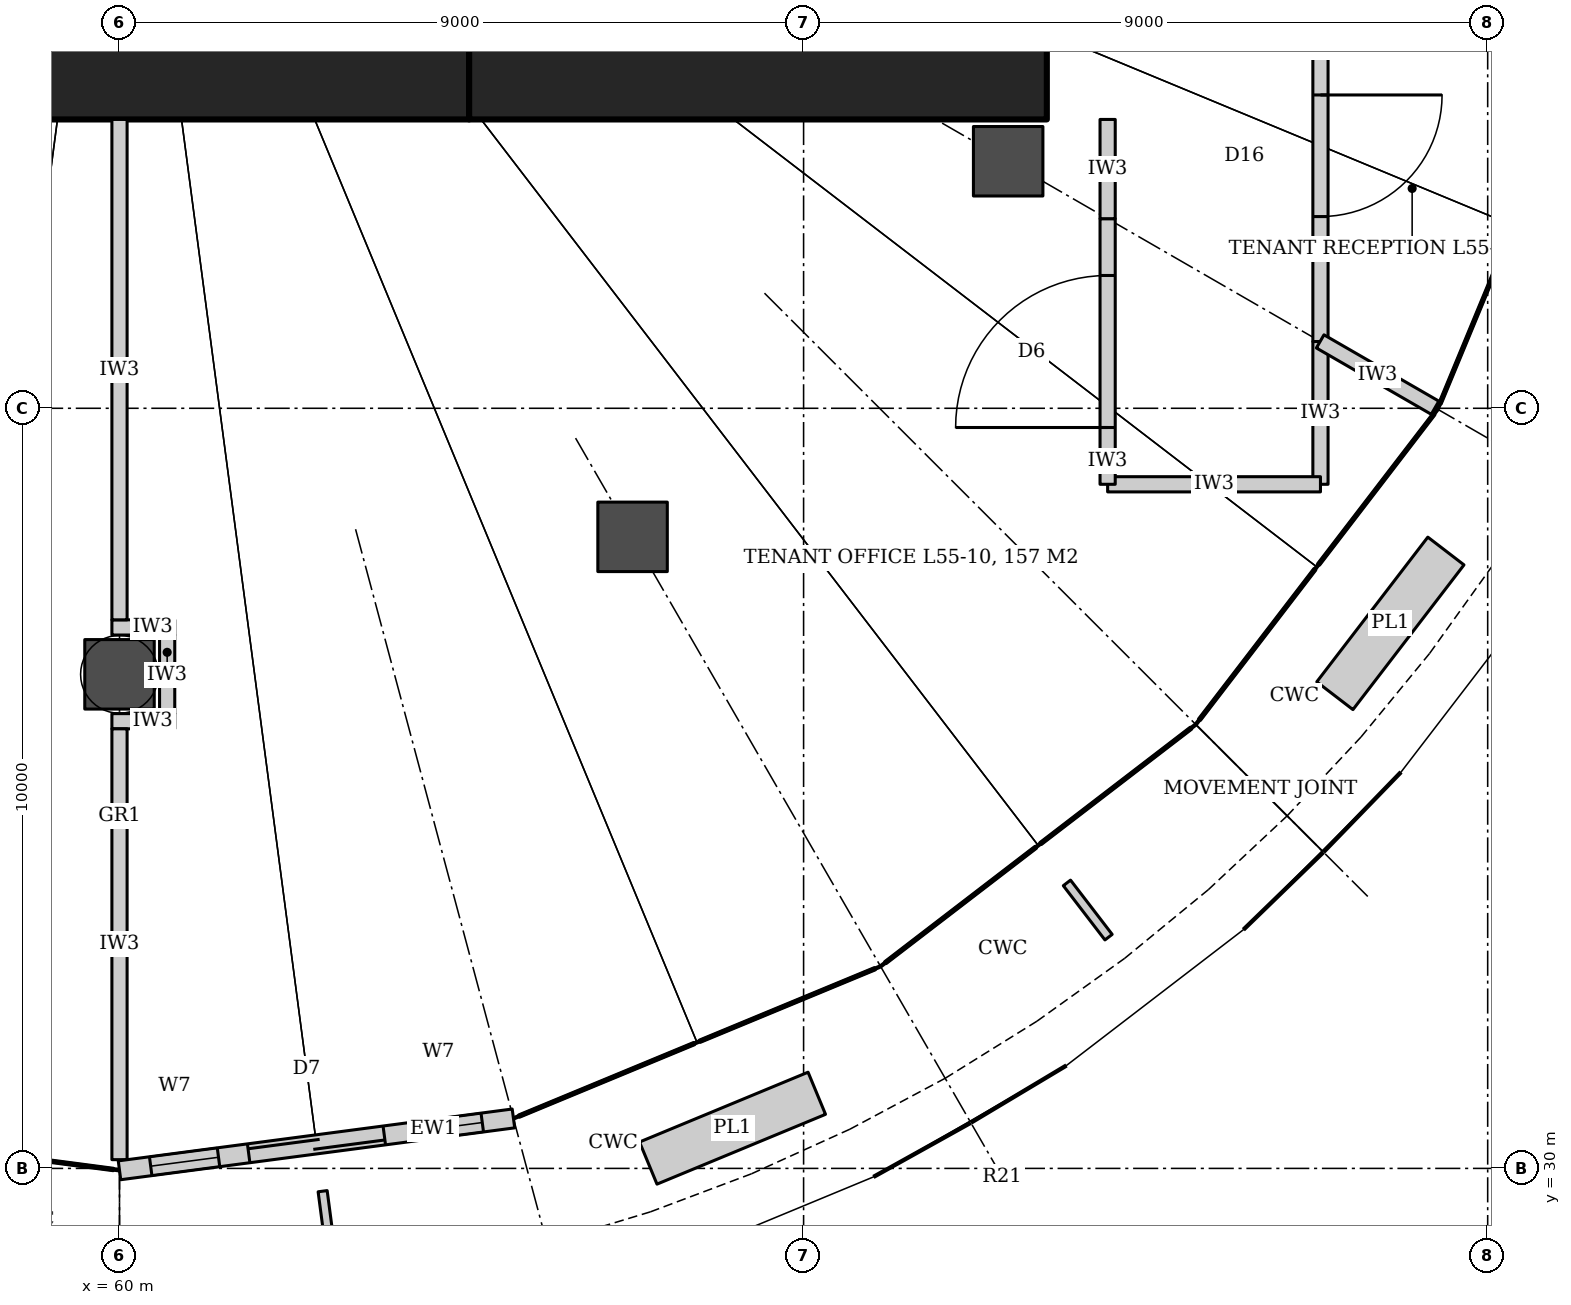
"""IFC4 building model, lengths in metres.
Left out: names, types, materials, properties, quantities, classifications, styles, units other than length and angle.
Written with IfcOpenShell. Run it as: python <this file> out.ifc"""

import sys

from ifc_helpers import new_model, si_unit, direction, frame, frame_2d, origin, origin_2d, place, context, subcontext, project, spatial, rectangle, hollow_circle, extrude, element, fill, save


model = new_model("IFC4")
c1 = context("Model", 3, precision=1e-05, world=origin(), true_north=direction((0.0, 1.0)))
c2 = subcontext(c1, "Body", "Model", "MODEL_VIEW")
j1 = project(units=[si_unit("LENGTHUNIT", "METRE"), si_unit("PLANEANGLEUNIT", "RADIAN")], contexts=[c1])
p1 = place(None, origin())
s1 = spatial("IfcSite", under=j1, at=p1, CompositionType="ELEMENT")
p2 = place(p1, origin())
s2 = spatial("IfcBuilding", under=s1, at=p2, CompositionType="ELEMENT")
p3 = place(p2, frame((0.0, 0.0, 240.2)))
s3 = spatial("IfcBuildingStorey", under=s2, at=p3, CompositionType="ELEMENT", Elevation=240.2)
p4 = place(p3, frame((55.4, 44.55, 0.0), z_axis=(0.0, 0.0, 1.0), x_axis=(1.0, 0.0, 0.0)))
e1 = element("IfcWall", 1, at=p4, inside=s3, PredefinedType="SHEAR", context=c2, shape_type="SweptSolid", body=[
    extrude(rectangle(XDim=9.2, YDim=1.5, at=frame_2d((4.6, 0.0))), origin(), (0.0, 0.0, 1.0), 4.2),
])
p5 = place(p3, frame((64.6, 44.55, 0.0), z_axis=(0.0, 0.0, 1.0), x_axis=(1.0, 0.0, 0.0)))
e2 = element("IfcWall", 2, at=p5, inside=s3, PredefinedType="SHEAR", context=c2, shape_type="SweptSolid", body=[
    extrude(rectangle(XDim=7.6, YDim=1.5, at=frame_2d((3.8, 0.0))), origin(), (0.0, 0.0, 1.0), 4.2),
])
for number, where, z_axis, x_axis in (
    (3, (60.0, 36.5, 0.0), (0.0, 0.0, 1.0), (1.0, 0.0, 0.0)),
    (4, (66.75, 38.309, 0.0), (0.0, 0.0, 1.0), (1.0, 0.0, 0.0)),
    (5, (71.691, 43.25, 0.0), (0.0, 0.0, 1.0), (1.0, 0.0, 0.0)),
):
    element("IfcColumn", number, at=place(p3, frame(where, z_axis=z_axis, x_axis=x_axis)), inside=s3, PredefinedType="COLUMN", context=c2, shape_type="SweptSolid", body=[
        extrude(hollow_circle(Radius=0.457, WallThickness=0.045, at=origin_2d()), origin(), (0.0, 0.0, 1.0), 4.2),
    ])
p6 = place(p3, frame((75.8, 45.766, 0.0), z_axis=(0.0, 0.0, 1.0), x_axis=(0.0, -1.0, 0.0)))
e6 = element("IfcWall", 6, at=p6, inside=s3, PredefinedType="PARTITIONING", context=c2, shape_type="SweptSolid", body=[
    extrude(rectangle(XDim=4.888, YDim=0.2, at=frame_2d((2.444, 0.0))), origin(), (0.0, 0.0, 1.0), 3.02),
])
p7 = place(p6, frame((1.644, 0.0, 0.0)))
e7 = element("IfcOpeningElement", 7, at=p7, cuts=e6, PredefinedType="OPENING", context=c2, shape_type="SweptSolid", body=[
    extrude(rectangle(XDim=1.6, YDim=2.4, at=frame_2d((0.8, 1.2))), frame((0.0, 0.11, 0.0), z_axis=(0.0, -1.0, 0.0), x_axis=(1.0, 0.0, 0.0)), (0.0, 0.0, 1.0), 0.22),
])
p8 = place(p3, frame((75.8, 40.878, 0.0), z_axis=(0.0, 0.0, 1.0), x_axis=(0.0, -1.0, 0.0)))
e8 = element("IfcWall", 8, at=p8, inside=s3, PredefinedType="PARTITIONING", context=c2, shape_type="SweptSolid", body=[
    extrude(rectangle(XDim=1.878, YDim=0.2, at=frame_2d((0.939, 0.0))), origin(), (0.0, 0.0, 1.0), 3.02),
])
p9 = place(p3, frame((75.8, 39.0, 0.0), z_axis=(0.0, 0.0, 1.0), x_axis=(-1.0, 0.0, 0.0)))
e9 = element("IfcWall", 9, at=p9, inside=s3, PredefinedType="PARTITIONING", context=c2, shape_type="SweptSolid", body=[
    extrude(rectangle(XDim=2.8, YDim=0.2, at=frame_2d((1.4, 0.0))), origin(), (0.0, 0.0, 1.0), 3.04),
])
p10 = place(p3, frame((73.0, 39.0, 0.0), z_axis=(0.0, 0.0, 1.0), x_axis=(0.0, 1.0, 0.0)))
e10 = element("IfcWall", 10, at=p10, inside=s3, PredefinedType="PARTITIONING", context=c2, shape_type="SweptSolid", body=[
    extrude(rectangle(XDim=3.494, YDim=0.2, at=frame_2d((1.747, 0.0))), origin(), (0.0, 0.0, 1.0), 3.02),
])
p11 = place(p10, frame((0.747, 0.0, 0.0)))
e11 = element("IfcOpeningElement", 11, at=p11, cuts=e10, PredefinedType="OPENING", context=c2, shape_type="SweptSolid", body=[
    extrude(rectangle(XDim=2.0, YDim=2.1, at=frame_2d((1.0, 1.05))), frame((0.0, 0.11, 0.0), z_axis=(0.0, -1.0, 0.0), x_axis=(1.0, 0.0, 0.0)), (0.0, 0.0, 1.0), 0.22),
])
p12 = place(p3, frame((73.0, 42.494, 0.0), z_axis=(0.0, 0.0, 1.0), x_axis=(0.0, 1.0, 0.0)))
e12 = element("IfcWall", 12, at=p12, inside=s3, PredefinedType="PARTITIONING", context=c2, shape_type="SweptSolid", body=[
    extrude(rectangle(XDim=1.306, YDim=0.2, at=frame_2d((0.653, 0.0))), origin(), (0.0, 0.0, 1.0), 3.02),
])
for number, where, z_axis, x_axis in (
    (13, (59.9, 37.117, 0.0), (0.0, 0.0, 1.0), (1.0, 0.0, 0.0)),
    (14, (59.9, 35.883, 0.0), (0.0, 0.0, 1.0), (1.0, 0.0, 0.0)),
):
    element("IfcWall", number, at=place(p3, frame(where, z_axis=z_axis, x_axis=x_axis)), inside=s3, PredefinedType="PARTITIONING", context=c2, shape_type="SweptSolid", body=[
        extrude(rectangle(XDim=0.827, YDim=0.2, at=frame_2d((0.414, 0.0))), origin(), (0.0, 0.0, 1.0), 3.02),
    ])
p13 = place(p3, frame((60.627, 37.017, 0.0), z_axis=(0.0, 0.0, 1.0), x_axis=(0.0, -1.0, 0.0)))
e15 = element("IfcWall", 15, at=p13, inside=s3, PredefinedType="PARTITIONING", context=c2, shape_type="SweptSolid", body=[
    extrude(rectangle(XDim=1.034, YDim=0.2, at=frame_2d((0.517, 0.0))), origin(), (0.0, 0.0, 1.0), 3.02),
])
p14 = place(p3, frame((60.0, 43.8, 0.0), z_axis=(0.0, 0.0, 1.0), x_axis=(0.0, -1.0, 0.0)))
e16 = element("IfcWall", 16, at=p14, inside=s3, PredefinedType="PARTITIONING", context=c2, shape_type="SweptSolid", body=[
    extrude(rectangle(XDim=6.583, YDim=0.2, at=frame_2d((3.292, 0.0))), origin(), (0.0, 0.0, 1.0), 3.04),
])
p15 = place(p3, frame((60.0, 35.783, 0.0), z_axis=(0.0, 0.0, 1.0), x_axis=(0.0, -1.0, 0.0)))
e17 = element("IfcWall", 17, at=p15, inside=s3, PredefinedType="PARTITIONING", context=c2, shape_type="SweptSolid", body=[
    extrude(rectangle(XDim=5.668, YDim=0.2, at=frame_2d((2.834, 0.0))), origin(), (0.0, 0.0, 1.0), 3.02),
])
p16 = place(p3, frame((75.796, 40.88, 0.0), z_axis=(0.0, 0.0, 1.0), x_axis=(0.866073756611, -0.499916241094, 0.0)))
e18 = element("IfcWall", 18, at=p16, inside=s3, PredefinedType="PARTITIONING", context=c2, shape_type="SweptSolid", body=[
    extrude(rectangle(XDim=1.745, YDim=0.2, at=frame_2d((0.873, 0.0))), origin(), (0.0, 0.0, 1.0), 3.02),
])
p17 = place(p3, frame((60.0, 29.975, 0.0), z_axis=(0.0, 0.0, 1.0), x_axis=(0.99145000307, 0.130487131216, 0.0)))
e19 = element("IfcWall", 19, at=p17, inside=s3, PredefinedType="SOLIDWALL", context=c2, shape_type="SweptSolid", body=[
    extrude(rectangle(XDim=5.228, YDim=0.25, at=frame_2d((2.614, 0.0))), origin(), (0.0, 0.0, 1.0), 4.04),
])
p18 = place(p17, frame((1.714, 0.0, 0.0)))
e20 = element("IfcOpeningElement", 20, at=p18, cuts=e19, PredefinedType="OPENING", context=c2, shape_type="SweptSolid", body=[
    extrude(rectangle(XDim=1.8, YDim=2.4, at=frame_2d((0.9, 1.2))), frame((0.0, 0.135, 0.0), z_axis=(0.0, -1.0, 0.0), x_axis=(1.0, 0.0, 0.0)), (0.0, 0.0, 1.0), 0.27),
])
p19 = place(p17, frame((0.414, 0.0, 0.0)))
e21 = element("IfcOpeningElement", 21, at=p19, cuts=e19, PredefinedType="OPENING", context=c2, shape_type="SweptSolid", body=[
    extrude(rectangle(XDim=0.9, YDim=2.4, at=frame_2d((0.45, 1.2))), frame((0.0, 0.135, 0.0), z_axis=(0.0, -1.0, 0.0), x_axis=(1.0, 0.0, 0.0)), (0.0, 0.0, 1.0), 0.27),
])
p20 = place(p17, frame((3.914, 0.0, 0.0)))
e22 = element("IfcOpeningElement", 22, at=p20, cuts=e19, PredefinedType="OPENING", context=c2, shape_type="SweptSolid", body=[
    extrude(rectangle(XDim=0.9, YDim=2.4, at=frame_2d((0.45, 1.2))), frame((0.0, 0.135, 0.0), z_axis=(0.0, -1.0, 0.0), x_axis=(1.0, 0.0, 0.0)), (0.0, 0.0, 1.0), 0.27),
])
p21 = place(p11, origin())
e23 = element("IfcDoor", 23, at=p21, inside=s3, OperationType="DOUBLE_DOOR_DOUBLE_SWING", PredefinedType="DOOR", context=c2, shape_type="SweptSolid", body=[
    extrude(rectangle(XDim=2.0, YDim=2.1, at=frame_2d((1.0, 1.05))), frame((0.0, 0.025, 0.0), z_axis=(0.0, -1.0, 0.0), x_axis=(1.0, 0.0, 0.0)), (0.0, 0.0, 1.0), 0.05),
])
fill(e11, e23)
p22 = place(p7, origin())
e24 = element("IfcDoor", 24, at=p22, inside=s3, OperationType="DOUBLE_DOOR_DOUBLE_SWING", PredefinedType="DOOR", context=c2, shape_type="SweptSolid", body=[
    extrude(rectangle(XDim=1.6, YDim=2.4, at=frame_2d((0.8, 1.2))), frame((0.0, 0.025, 0.0), z_axis=(0.0, -1.0, 0.0), x_axis=(1.0, 0.0, 0.0)), (0.0, 0.0, 1.0), 0.05),
])
fill(e7, e24)
p23 = place(p18, origin())
e25 = element("IfcDoor", 25, at=p23, inside=s3, OperationType="DOUBLE_DOOR_SLIDING", PredefinedType="DOOR", context=c2, shape_type="SweptSolid", body=[
    extrude(rectangle(XDim=1.8, YDim=2.4, at=frame_2d((0.9, 1.2))), frame((0.0, 0.025, 0.0), z_axis=(0.0, -1.0, 0.0), x_axis=(1.0, 0.0, 0.0)), (0.0, 0.0, 1.0), 0.05),
])
fill(e20, e25)
p24 = place(p19, origin())
e26 = element("IfcWindow", 26, at=p24, inside=s3, PartitioningType="SINGLE_PANEL", PredefinedType="WINDOW", context=c2, shape_type="SweptSolid", body=[
    extrude(rectangle(XDim=0.9, YDim=2.4, at=frame_2d((0.45, 1.2))), frame((0.0, 0.03, 0.0), z_axis=(0.0, -1.0, 0.0), x_axis=(1.0, 0.0, 0.0)), (0.0, 0.0, 1.0), 0.06),
])
fill(e21, e26)
p25 = place(p20, origin())
e27 = element("IfcWindow", 27, at=p25, inside=s3, PartitioningType="SINGLE_PANEL", PredefinedType="WINDOW", context=c2, shape_type="SweptSolid", body=[
    extrude(rectangle(XDim=0.9, YDim=2.4, at=frame_2d((0.45, 1.2))), frame((0.0, 0.03, 0.0), z_axis=(0.0, -1.0, 0.0), x_axis=(1.0, 0.0, 0.0)), (0.0, 0.0, 1.0), 0.06),
])
fill(e22, e27)
save(model, sys.argv[1])
